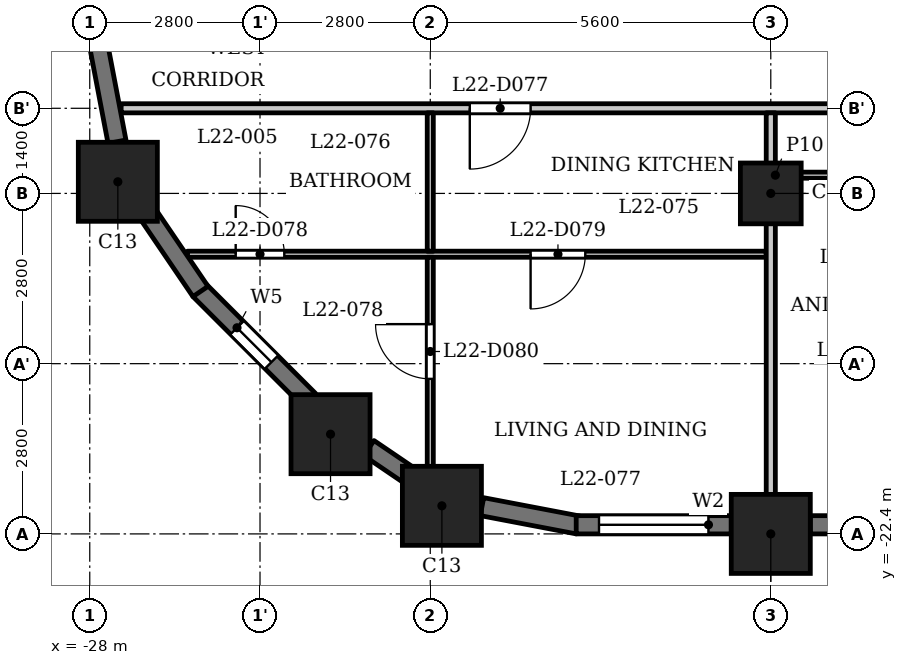
"""IFC4 building model, lengths in metres.
Left out: names, types, materials, properties, quantities, classifications, styles, units other than length and angle.
Written with IfcOpenShell. Run it as: python <this file> out.ifc"""

import sys

from ifc_helpers import new_model, si_unit, direction, frame, frame_2d, origin, origin_2d, place, context, subcontext, project, spatial, rectangle, extrude, element, fill, save


model = new_model("IFC4")
c1 = context("Model", 3, precision=1e-05, world=origin(), true_north=direction((0.0, 1.0)))
c2 = subcontext(c1, "Body", "Model", "MODEL_VIEW")
j1 = project(units=[si_unit("LENGTHUNIT", "METRE"), si_unit("PLANEANGLEUNIT", "RADIAN")], contexts=[c1])
p1 = place(None, origin())
s1 = spatial("IfcSite", under=j1, at=p1, CompositionType="ELEMENT")
p2 = place(p1, origin())
s2 = spatial("IfcBuilding", under=s1, at=p2, CompositionType="ELEMENT")
p3 = place(p2, frame((0.0, 0.0, 90.3)))
s3 = spatial("IfcBuildingStorey", under=s2, at=p3, CompositionType="ELEMENT", Elevation=90.3)
for number, where, z_axis, x_axis in (
    (1, (-22.209, -21.938, 0.0), (0.0, 0.0, 1.0), (1.0, 0.0, 0.0)),
    (2, (-16.8, -22.4, 0.0), (0.0, 0.0, 1.0), (1.0, 0.0, 0.0)),
    (3, (-27.538, -16.609, 0.0), (0.0, 0.0, 1.0), (1.0, 0.0, 0.0)),
    (4, (-24.04, -20.76, 0.0), (0.0, 0.0, 1.0), (1.0, 0.0, 0.0)),
):
    element("IfcColumn", number, at=place(p3, frame(where, z_axis=z_axis, x_axis=x_axis)), inside=s3, PredefinedType="COLUMN", context=c2, shape_type="SweptSolid", body=[
        extrude(rectangle(XDim=1.3, YDim=1.3, at=origin_2d()), origin(), (0.0, 0.0, 1.0), 3.5),
    ])
p4 = place(p3, frame((-16.8, -16.8, 0.0), z_axis=(0.0, 0.0, 1.0), x_axis=(1.0, 0.0, 0.0)))
e5 = element("IfcColumn", 5, at=p4, inside=s3, PredefinedType="COLUMN", context=c2, shape_type="SweptSolid", body=[
    extrude(rectangle(XDim=1.0, YDim=1.0, at=origin_2d()), origin(), (0.0, 0.0, 1.0), 3.5),
])
p5 = place(p3, frame((-26.197, -18.391, 0.0), z_axis=(0.0, 0.0, 1.0), x_axis=(0.707058908279, -0.707154650853, 0.0)))
e6 = element("IfcWall", 6, at=p5, inside=s3, PredefinedType="SOLIDWALL", context=c2, shape_type="SweptSolid", body=[
    extrude(rectangle(XDim=2.55, YDim=0.3, at=frame_2d((1.275, 0.0))), origin(), (0.0, 0.0, 1.0), 2.4),
])
p6 = place(p5, frame((0.875, 0.0, 0.6)))
e7 = element("IfcOpeningElement", 7, at=p6, cuts=e6, PredefinedType="OPENING", context=c2, shape_type="SweptSolid", body=[
    extrude(rectangle(XDim=0.8, YDim=1.55, at=frame_2d((0.4, 0.775))), frame((0.0, 0.16, 0.0), z_axis=(0.0, -1.0, 0.0), x_axis=(1.0, 0.0, 0.0)), (0.0, 0.0, 1.0), 0.32),
])
p7 = place(p3, frame((-23.41, -20.989, 0.0), z_axis=(0.0, 0.0, 1.0), x_axis=(0.827050703543, -0.562127328787, 0.0)))
e8 = element("IfcWall", 8, at=p7, inside=s3, PredefinedType="SOLIDWALL", context=c2, shape_type="SweptSolid", body=[
    extrude(rectangle(XDim=0.877, YDim=0.3, at=frame_2d((0.438, 0.0))), origin(), (0.0, 0.0, 1.0), 3.2),
])
p8 = place(p3, frame((-21.55, -21.952, 0.0), z_axis=(0.0, 0.0, 1.0), x_axis=(0.982278644094, -0.187426426519, 0.0)))
e9 = element("IfcWall", 9, at=p8, inside=s3, PredefinedType="SOLIDWALL", context=c2, shape_type="SweptSolid", body=[
    extrude(rectangle(XDim=1.606, YDim=0.3, at=frame_2d((0.803, 0.0))), origin(), (0.0, 0.0, 1.0), 2.4),
])
p9 = place(p3, frame((-20.0, -22.25, 0.0), z_axis=(0.0, 0.0, 1.0), x_axis=(1.0, 0.0, 0.0)))
e10 = element("IfcWall", 10, at=p9, inside=s3, PredefinedType="SOLIDWALL", context=c2, shape_type="SweptSolid", body=[
    extrude(rectangle(XDim=2.55, YDim=0.3, at=frame_2d((1.275, 0.0))), origin(), (0.0, 0.0, 1.0), 2.4),
])
p10 = place(p9, frame((0.375, 0.0, 0.9)))
e11 = element("IfcOpeningElement", 11, at=p10, cuts=e10, PredefinedType="OPENING", context=c2, shape_type="SweptSolid", body=[
    extrude(rectangle(XDim=1.8, YDim=1.25, at=frame_2d((0.9, 0.625))), frame((0.0, 0.16, 0.0), z_axis=(0.0, -1.0, 0.0), x_axis=(1.0, 0.0, 0.0)), (0.0, 0.0, 1.0), 0.32),
])
p11 = place(p3, frame((-16.15, -22.25, 0.0), z_axis=(0.0, 0.0, 1.0), x_axis=(1.0, 0.0, 0.0)))
e12 = element("IfcWall", 12, at=p11, inside=s3, PredefinedType="SOLIDWALL", context=c2, shape_type="SweptSolid", body=[
    extrude(rectangle(XDim=4.3, YDim=0.3, at=frame_2d((2.15, 0.0))), origin(), (0.0, 0.0, 1.0), 2.4),
])
p12 = place(p11, frame((0.538, 0.0, 0.6)))
e13 = element("IfcOpeningElement", 13, at=p12, cuts=e12, PredefinedType="OPENING", context=c2, shape_type="SweptSolid", body=[
    extrude(rectangle(XDim=1.2, YDim=1.55, at=frame_2d((0.6, 0.775))), frame((0.0, 0.16, 0.0), z_axis=(0.0, -1.0, 0.0), x_axis=(1.0, 0.0, 0.0)), (0.0, 0.0, 1.0), 0.32),
])
p13 = place(p11, frame((2.762, 0.0, 0.6)))
e14 = element("IfcOpeningElement", 14, at=p13, cuts=e12, PredefinedType="OPENING", context=c2, shape_type="SweptSolid", body=[
    extrude(rectangle(XDim=1.2, YDim=1.55, at=frame_2d((0.6, 0.775))), frame((0.0, 0.16, 0.0), z_axis=(0.0, -1.0, 0.0), x_axis=(1.0, 0.0, 0.0)), (0.0, 0.0, 1.0), 0.32),
])
for number, where, z_axis, x_axis in (
    (15, (-27.853, -14.372, 0.0), (0.0, 0.0, 1.0), (0.187, -0.982, 0.0)),
    (16, (-27.082, -17.084, 0.0), (0.0, 0.0, 1.0), (0.562, -0.827, 0.0)),
):
    element("IfcWall", number, at=place(p3, frame(where, z_axis=z_axis, x_axis=x_axis)), inside=s3, PredefinedType="SOLIDWALL", context=c2, shape_type="SweptSolid", body=[
        extrude(rectangle(XDim=1.606, YDim=0.3, at=frame_2d((0.803, 0.0))), origin(), (0.0, 0.0, 1.0), 2.4),
    ])
p14 = place(p3, frame((-26.394, -17.8, 0.0), z_axis=(0.0, 0.0, 1.0), x_axis=(1.0, 0.0, 0.0)))
e17 = element("IfcWall", 17, at=p14, inside=s3, PredefinedType="PARTITIONING", context=c2, shape_type="SweptSolid", body=[
    extrude(rectangle(XDim=9.519, YDim=0.1, at=frame_2d((4.76, 0.0))), origin(), (0.0, 0.0, 1.0), 3.2),
])
p15 = place(p14, frame((0.794, 0.0, 0.0)))
e18 = element("IfcOpeningElement", 18, at=p15, cuts=e17, PredefinedType="OPENING", context=c2, shape_type="SweptSolid", body=[
    extrude(rectangle(XDim=0.8, YDim=2.1, at=frame_2d((0.4, 1.05))), frame((0.0, 0.06, 0.0), z_axis=(0.0, -1.0, 0.0), x_axis=(1.0, 0.0, 0.0)), (0.0, 0.0, 1.0), 0.12),
])
p16 = place(p14, frame((5.644, 0.0, 0.0)))
e19 = element("IfcOpeningElement", 19, at=p16, cuts=e17, PredefinedType="OPENING", context=c2, shape_type="SweptSolid", body=[
    extrude(rectangle(XDim=0.9, YDim=2.1, at=frame_2d((0.45, 1.05))), frame((0.0, 0.06, 0.0), z_axis=(0.0, -1.0, 0.0), x_axis=(1.0, 0.0, 0.0)), (0.0, 0.0, 1.0), 0.12),
])
p17 = place(p3, frame((-16.725, -16.5, 0.0), z_axis=(0.0, 0.0, 1.0), x_axis=(1.0, 0.0, 0.0)))
e20 = element("IfcWall", 20, at=p17, inside=s3, PredefinedType="PARTITIONING", context=c2, shape_type="SweptSolid", body=[
    extrude(rectangle(XDim=33.45, YDim=0.1, at=frame_2d((16.725, 0.0))), origin(), (0.0, 0.0, 1.0), 3.2),
])
p18 = place(p17, frame((3.825, 0.0, 0.0)))
e21 = element("IfcOpeningElement", 21, at=p18, cuts=e20, PredefinedType="OPENING", context=c2, shape_type="SweptSolid", body=[
    extrude(rectangle(XDim=0.8, YDim=2.1, at=frame_2d((0.4, 1.05))), frame((0.0, 0.06, 0.0), z_axis=(0.0, -1.0, 0.0), x_axis=(1.0, 0.0, 0.0)), (0.0, 0.0, 1.0), 0.12),
])
p19 = place(p17, frame((1.825, 0.0, 0.0)))
e22 = element("IfcOpeningElement", 22, at=p19, cuts=e20, PredefinedType="OPENING", context=c2, shape_type="SweptSolid", body=[
    extrude(rectangle(XDim=0.9, YDim=2.1, at=frame_2d((0.45, 1.05))), frame((0.0, 0.06, 0.0), z_axis=(0.0, -1.0, 0.0), x_axis=(1.0, 0.0, 0.0)), (0.0, 0.0, 1.0), 0.12),
])
p20 = place(p17, frame((9.675, 0.0, 0.0)))
e23 = element("IfcOpeningElement", 23, at=p20, cuts=e20, PredefinedType="OPENING", context=c2, shape_type="SweptSolid", body=[
    extrude(rectangle(XDim=0.8, YDim=2.1, at=frame_2d((0.4, 1.05))), frame((0.0, 0.06, 0.0), z_axis=(0.0, -1.0, 0.0), x_axis=(1.0, 0.0, 0.0)), (0.0, 0.0, 1.0), 0.12),
])
p21 = place(p17, frame((6.425, 0.0, 0.0)))
e24 = element("IfcOpeningElement", 24, at=p21, cuts=e20, PredefinedType="OPENING", context=c2, shape_type="SweptSolid", body=[
    extrude(rectangle(XDim=0.9, YDim=2.1, at=frame_2d((0.45, 1.05))), frame((0.0, 0.06, 0.0), z_axis=(0.0, -1.0, 0.0), x_axis=(1.0, 0.0, 0.0)), (0.0, 0.0, 1.0), 0.12),
])
p22 = place(p17, frame((15.275, 0.0, 0.0)))
e25 = element("IfcOpeningElement", 25, at=p22, cuts=e20, PredefinedType="OPENING", context=c2, shape_type="SweptSolid", body=[
    extrude(rectangle(XDim=0.8, YDim=2.1, at=frame_2d((0.4, 1.05))), frame((0.0, 0.06, 0.0), z_axis=(0.0, -1.0, 0.0), x_axis=(1.0, 0.0, 0.0)), (0.0, 0.0, 1.0), 0.12),
])
p23 = place(p17, frame((12.025, 0.0, 0.0)))
e26 = element("IfcOpeningElement", 26, at=p23, cuts=e20, PredefinedType="OPENING", context=c2, shape_type="SweptSolid", body=[
    extrude(rectangle(XDim=0.9, YDim=2.1, at=frame_2d((0.45, 1.05))), frame((0.0, 0.06, 0.0), z_axis=(0.0, -1.0, 0.0), x_axis=(1.0, 0.0, 0.0)), (0.0, 0.0, 1.0), 0.12),
])
p24 = place(p17, frame((20.875, 0.0, 0.0)))
e27 = element("IfcOpeningElement", 27, at=p24, cuts=e20, PredefinedType="OPENING", context=c2, shape_type="SweptSolid", body=[
    extrude(rectangle(XDim=0.8, YDim=2.1, at=frame_2d((0.4, 1.05))), frame((0.0, 0.06, 0.0), z_axis=(0.0, -1.0, 0.0), x_axis=(1.0, 0.0, 0.0)), (0.0, 0.0, 1.0), 0.12),
])
p25 = place(p17, frame((18.625, 0.0, 0.0)))
e28 = element("IfcOpeningElement", 28, at=p25, cuts=e20, PredefinedType="OPENING", context=c2, shape_type="SweptSolid", body=[
    extrude(rectangle(XDim=0.9, YDim=2.1, at=frame_2d((0.45, 1.05))), frame((0.0, 0.06, 0.0), z_axis=(0.0, -1.0, 0.0), x_axis=(1.0, 0.0, 0.0)), (0.0, 0.0, 1.0), 0.12),
])
p26 = place(p17, frame((23.875, 0.0, 0.0)))
e29 = element("IfcOpeningElement", 29, at=p26, cuts=e20, PredefinedType="OPENING", context=c2, shape_type="SweptSolid", body=[
    extrude(rectangle(XDim=0.8, YDim=2.1, at=frame_2d((0.4, 1.05))), frame((0.0, 0.06, 0.0), z_axis=(0.0, -1.0, 0.0), x_axis=(1.0, 0.0, 0.0)), (0.0, 0.0, 1.0), 0.12),
])
p27 = place(p17, frame((26.225, 0.0, 0.0)))
e30 = element("IfcOpeningElement", 30, at=p27, cuts=e20, PredefinedType="OPENING", context=c2, shape_type="SweptSolid", body=[
    extrude(rectangle(XDim=0.9, YDim=2.1, at=frame_2d((0.45, 1.05))), frame((0.0, 0.06, 0.0), z_axis=(0.0, -1.0, 0.0), x_axis=(1.0, 0.0, 0.0)), (0.0, 0.0, 1.0), 0.12),
])
p28 = place(p17, frame((28.575, 0.0, 0.0)))
e31 = element("IfcOpeningElement", 31, at=p28, cuts=e20, PredefinedType="OPENING", context=c2, shape_type="SweptSolid", body=[
    extrude(rectangle(XDim=0.9, YDim=2.1, at=frame_2d((0.45, 1.05))), frame((0.0, 0.06, 0.0), z_axis=(0.0, -1.0, 0.0), x_axis=(1.0, 0.0, 0.0)), (0.0, 0.0, 1.0), 0.12),
])
p29 = place(p17, frame((30.675, 0.0, 0.0)))
e32 = element("IfcOpeningElement", 32, at=p29, cuts=e20, PredefinedType="OPENING", context=c2, shape_type="SweptSolid", body=[
    extrude(rectangle(XDim=0.9, YDim=2.1, at=frame_2d((0.45, 1.05))), frame((0.0, 0.06, 0.0), z_axis=(0.0, -1.0, 0.0), x_axis=(1.0, 0.0, 0.0)), (0.0, 0.0, 1.0), 0.12),
])
p30 = place(p3, frame((-27.484, -15.4, 0.0), z_axis=(0.0, 0.0, 1.0), x_axis=(1.0, 0.0, 0.0)))
e33 = element("IfcWall", 33, at=p30, inside=s3, PredefinedType="PARTITIONING", context=c2, shape_type="SweptSolid", body=[
    extrude(rectangle(XDim=12.559, YDim=0.15, at=frame_2d((6.279, 0.0))), origin(), (0.0, 0.0, 1.0), 3.2),
])
p31 = place(p30, frame((5.734, 0.0, 0.0)))
e34 = element("IfcOpeningElement", 34, at=p31, cuts=e33, PredefinedType="OPENING", context=c2, shape_type="SweptSolid", body=[
    extrude(rectangle(XDim=1.0, YDim=2.1, at=frame_2d((0.5, 1.05))), frame((0.0, 0.085, 0.0), z_axis=(0.0, -1.0, 0.0), x_axis=(1.0, 0.0, 0.0)), (0.0, 0.0, 1.0), 0.17),
])
p32 = place(p3, frame((-22.4, -21.72, 0.0), z_axis=(0.0, 0.0, 1.0), x_axis=(0.0, 1.0, 0.0)))
e35 = element("IfcWall", 35, at=p32, inside=s3, PredefinedType="PARTITIONING", context=c2, shape_type="SweptSolid", body=[
    extrude(rectangle(XDim=3.87, YDim=0.1, at=frame_2d((1.935, 0.0))), origin(), (0.0, 0.0, 1.0), 3.2),
])
p33 = place(p32, frame((1.87, 0.0, 0.0)))
e36 = element("IfcOpeningElement", 36, at=p33, cuts=e35, PredefinedType="OPENING", context=c2, shape_type="SweptSolid", body=[
    extrude(rectangle(XDim=0.9, YDim=2.1, at=frame_2d((0.45, 1.05))), frame((0.0, 0.06, 0.0), z_axis=(0.0, -1.0, 0.0), x_axis=(1.0, 0.0, 0.0)), (0.0, 0.0, 1.0), 0.12),
])
p34 = place(p3, frame((-22.4, -17.75, 0.0), z_axis=(0.0, 0.0, 1.0), x_axis=(0.0, 1.0, 0.0)))
e37 = element("IfcWall", 37, at=p34, inside=s3, PredefinedType="PARTITIONING", context=c2, shape_type="SweptSolid", body=[
    extrude(rectangle(XDim=2.275, YDim=0.1, at=frame_2d((1.137, 0.0))), origin(), (0.0, 0.0, 1.0), 3.2),
])
p35 = place(p3, frame((-16.8, -23.03, 0.0), z_axis=(0.0, 0.0, 1.0), x_axis=(0.0, 1.0, 0.0)))
e38 = element("IfcWall", 38, at=p35, inside=s3, PredefinedType="PARTITIONING", context=c2, shape_type="SweptSolid", body=[
    extrude(rectangle(XDim=7.555, YDim=0.15, at=frame_2d((3.777, 0.0))), origin(), (0.0, 0.0, 1.0), 3.2),
])
p36 = place(p31, origin())
e39 = element("IfcDoor", 39, at=p36, inside=s3, OperationType="SINGLE_SWING_LEFT", PredefinedType="DOOR", context=c2, shape_type="SweptSolid", body=[
    extrude(rectangle(XDim=1.0, YDim=2.1, at=frame_2d((0.5, 1.05))), frame((0.0, 0.025, 0.0), z_axis=(0.0, -1.0, 0.0), x_axis=(1.0, 0.0, 0.0)), (0.0, 0.0, 1.0), 0.05),
])
fill(e34, e39)
p37 = place(p15, origin())
e40 = element("IfcDoor", 40, at=p37, inside=s3, OperationType="SINGLE_SWING_RIGHT", PredefinedType="DOOR", context=c2, shape_type="SweptSolid", body=[
    extrude(rectangle(XDim=0.8, YDim=2.1, at=frame_2d((0.4, 1.05))), frame((0.0, 0.025, 0.0), z_axis=(0.0, -1.0, 0.0), x_axis=(1.0, 0.0, 0.0)), (0.0, 0.0, 1.0), 0.05),
])
fill(e18, e40)
p38 = place(p16, origin())
e41 = element("IfcDoor", 41, at=p38, inside=s3, OperationType="SINGLE_SWING_LEFT", PredefinedType="DOOR", context=c2, shape_type="SweptSolid", body=[
    extrude(rectangle(XDim=0.9, YDim=2.1, at=frame_2d((0.45, 1.05))), frame((0.0, 0.025, 0.0), z_axis=(0.0, -1.0, 0.0), x_axis=(1.0, 0.0, 0.0)), (0.0, 0.0, 1.0), 0.05),
])
fill(e19, e41)
p39 = place(p33, origin())
e42 = element("IfcDoor", 42, at=p39, inside=s3, OperationType="SINGLE_SWING_LEFT", PredefinedType="DOOR", context=c2, shape_type="SweptSolid", body=[
    extrude(rectangle(XDim=0.9, YDim=2.1, at=frame_2d((0.45, 1.05))), frame((0.0, 0.025, 0.0), z_axis=(0.0, -1.0, 0.0), x_axis=(1.0, 0.0, 0.0)), (0.0, 0.0, 1.0), 0.05),
])
fill(e36, e42)
p40 = place(p6, origin())
e43 = element("IfcWindow", 43, at=p40, inside=s3, PartitioningType="SINGLE_PANEL", PredefinedType="WINDOW", context=c2, shape_type="SweptSolid", body=[
    extrude(rectangle(XDim=0.8, YDim=1.55, at=frame_2d((0.4, 0.775))), frame((0.0, 0.03, 0.0), z_axis=(0.0, -1.0, 0.0), x_axis=(1.0, 0.0, 0.0)), (0.0, 0.0, 1.0), 0.06),
])
fill(e7, e43)
p41 = place(p10, origin())
e44 = element("IfcWindow", 44, at=p41, inside=s3, PartitioningType="SINGLE_PANEL", PredefinedType="WINDOW", context=c2, shape_type="SweptSolid", body=[
    extrude(rectangle(XDim=1.8, YDim=1.25, at=frame_2d((0.9, 0.625))), frame((0.0, 0.03, 0.0), z_axis=(0.0, -1.0, 0.0), x_axis=(1.0, 0.0, 0.0)), (0.0, 0.0, 1.0), 0.06),
])
fill(e11, e44)
save(model, sys.argv[1])
